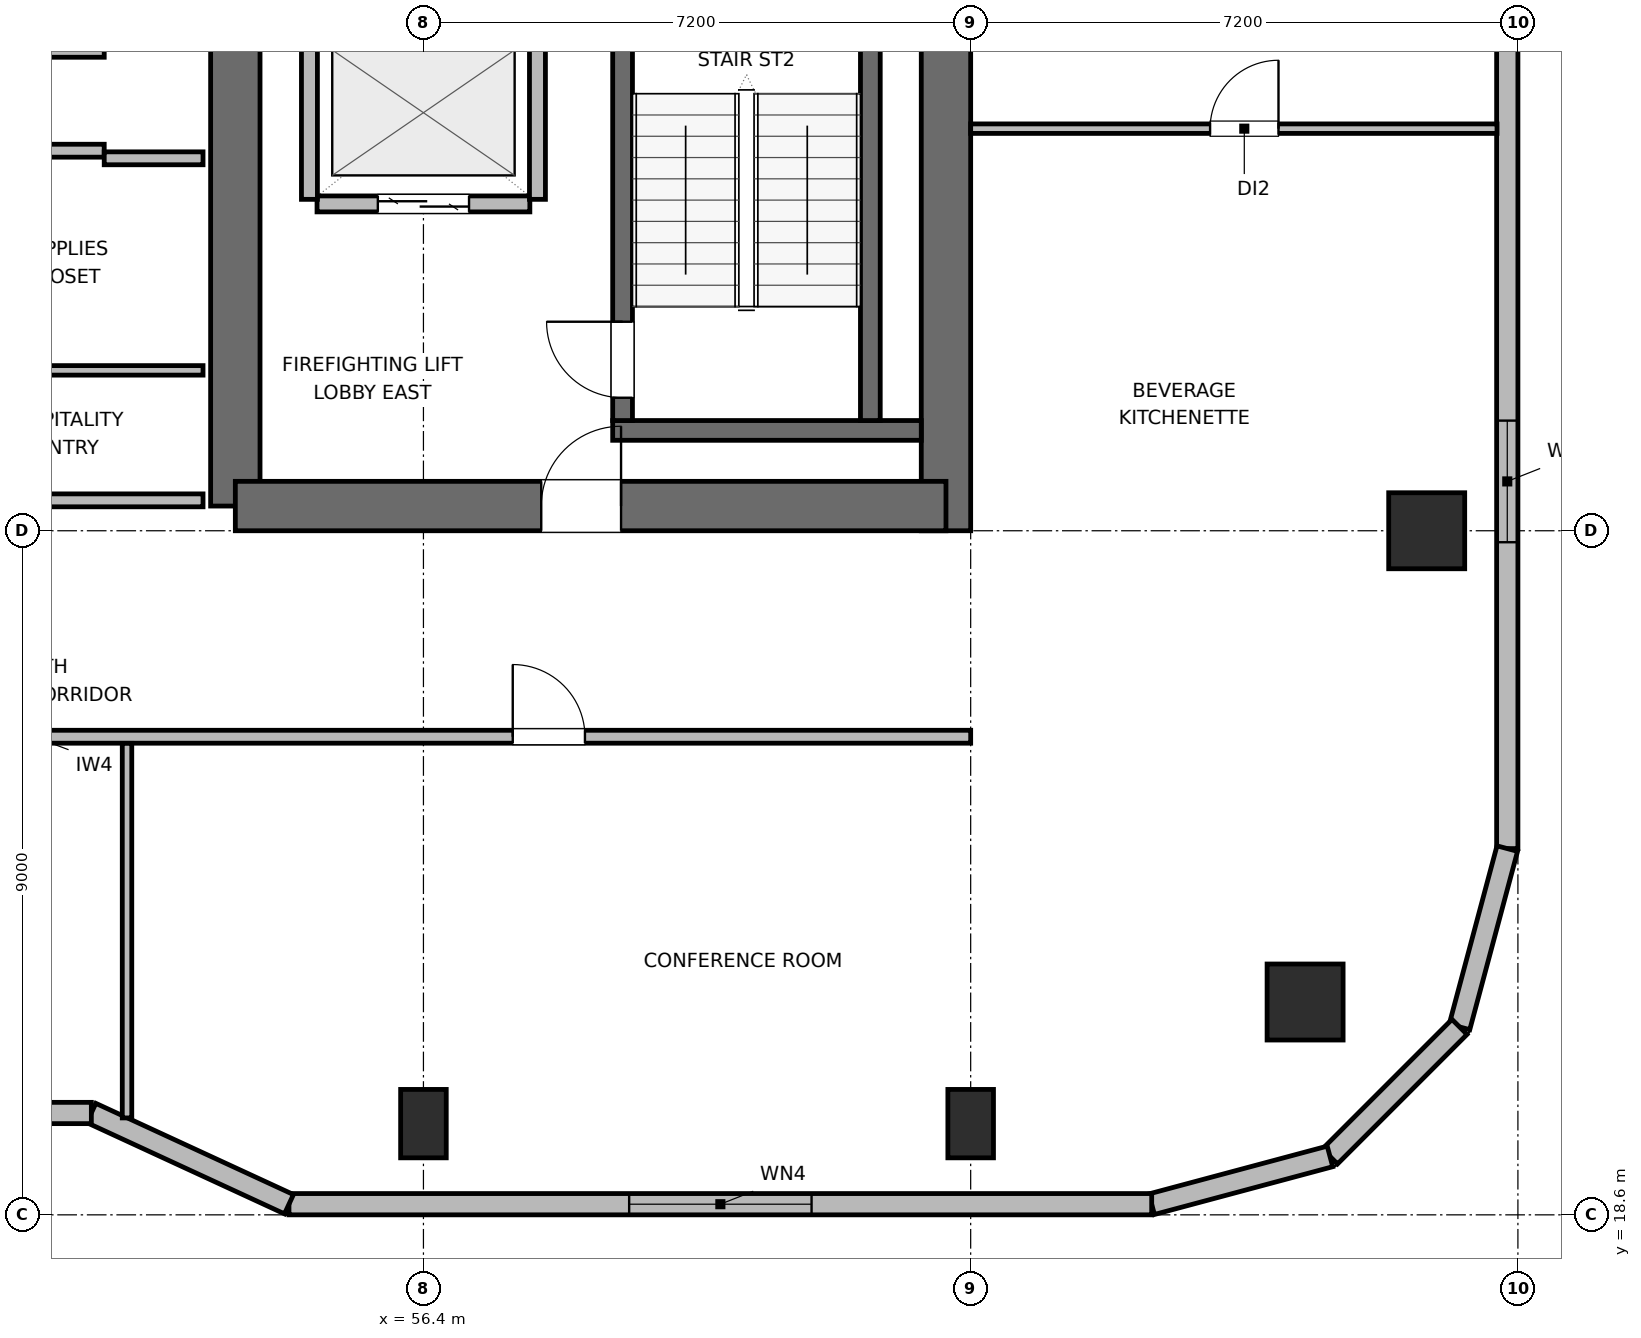
"""IFC4 building model, lengths in metres.
Left out: names, types, materials, properties, quantities, classifications, styles, units other than length and angle.
Written with IfcOpenShell. Run it as: python <this file> out.ifc"""

import sys

from ifc_helpers import new_model, si_unit, direction, frame, frame_2d, origin, origin_2d, place, context, subcontext, project, spatial, rectangle, circle, extrude, element, fill, save


model = new_model("IFC4")
c1 = context("Model", 3, precision=1e-05, world=origin(), true_north=direction((0.0, 1.0)))
c2 = subcontext(c1, "Body", "Model", "MODEL_VIEW")
j1 = project(units=[si_unit("LENGTHUNIT", "METRE"), si_unit("PLANEANGLEUNIT", "RADIAN")], contexts=[c1])
p1 = place(None, origin())
s1 = spatial("IfcSite", under=j1, at=p1, CompositionType="ELEMENT")
p2 = place(p1, origin())
s2 = spatial("IfcBuilding", under=s1, at=p2, CompositionType="ELEMENT")
p3 = place(p2, frame((0.0, 0.0, 258.9)))
s3 = spatial("IfcBuildingStorey", under=s2, at=p3, CompositionType="ELEMENT", Elevation=258.9)
p4 = place(p3, frame((53.925, 27.925, 0.0), z_axis=(0.0, 0.0, 1.0), x_axis=(0.0, 1.0, 0.0)))
e1 = element("IfcWall", 1, at=p4, inside=s3, PredefinedType="SHEAR", context=c2, shape_type="SweptSolid", body=[
    extrude(rectangle(XDim=7.875, YDim=0.65, at=frame_2d((3.938, 0.0))), origin(), (0.0, 0.0, 1.0), 3.9),
])
p5 = place(p3, frame((63.275, 27.6, 0.0), z_axis=(0.0, 0.0, 1.0), x_axis=(0.0, 1.0, 0.0)))
e2 = element("IfcWall", 2, at=p5, inside=s3, PredefinedType="SHEAR", context=c2, shape_type="SweptSolid", body=[
    extrude(rectangle(XDim=16.8, YDim=0.65, at=frame_2d((8.4, 0.0))), origin(), (0.0, 0.0, 1.0), 3.9),
])
p6 = place(p3, frame((53.925, 27.925, 0.0), z_axis=(0.0, 0.0, 1.0), x_axis=(1.0, 0.0, 0.0)))
e3 = element("IfcWall", 3, at=p6, inside=s3, PredefinedType="SHEAR", context=c2, shape_type="SweptSolid", body=[
    extrude(rectangle(XDim=9.35, YDim=0.65, at=frame_2d((4.675, 0.0))), origin(), (0.0, 0.0, 1.0), 3.9),
])
p7 = place(p6, frame((4.025, 0.0, 0.0)))
e4 = element("IfcOpeningElement", 4, at=p7, cuts=e3, PredefinedType="OPENING", context=c2, shape_type="SweptSolid", body=[
    extrude(rectangle(XDim=1.05, YDim=2.04, at=frame_2d((0.525, 1.02))), frame((0.0, 0.335, 0.0), z_axis=(0.0, -1.0, 0.0), x_axis=(1.0, 0.0, 0.0)), (0.0, 0.0, 1.0), 0.67),
])
p8 = place(p3, frame((58.89, 28.92, 0.0), z_axis=(0.0, 0.0, 1.0), x_axis=(1.0, 0.0, 0.0)))
e5 = element("IfcWall", 5, at=p8, inside=s3, PredefinedType="SHEAR", context=c2, shape_type="SweptSolid", body=[
    extrude(rectangle(XDim=4.06, YDim=0.26, at=frame_2d((2.03, 0.0))), origin(), (0.0, 0.0, 1.0), 3.9),
])
p9 = place(p3, frame((59.02, 29.05, 0.0), z_axis=(0.0, 0.0, 1.0), x_axis=(0.0, 1.0, 0.0)))
e6 = element("IfcWall", 6, at=p9, inside=s3, PredefinedType="SHEAR", context=c2, shape_type="SweptSolid", body=[
    extrude(rectangle(XDim=7.6, YDim=0.26, at=frame_2d((3.8, 0.0))), origin(), (0.0, 0.0, 1.0), 3.9),
])
p10 = place(p9, frame((0.3, 0.0, 0.0)))
e7 = element("IfcOpeningElement", 7, at=p10, cuts=e6, PredefinedType="OPENING", context=c2, shape_type="SweptSolid", body=[
    extrude(rectangle(XDim=1.0, YDim=2.04, at=frame_2d((0.5, 1.02))), frame((0.0, 0.14, 0.0), z_axis=(0.0, -1.0, 0.0), x_axis=(1.0, 0.0, 0.0)), (0.0, 0.0, 1.0), 0.28),
])
p11 = place(p3, frame((62.28, 29.05, 0.0), z_axis=(0.0, 0.0, 1.0), x_axis=(0.0, 1.0, 0.0)))
e8 = element("IfcWall", 8, at=p11, inside=s3, PredefinedType="SHEAR", context=c2, shape_type="SweptSolid", body=[
    extrude(rectangle(XDim=7.6, YDim=0.26, at=frame_2d((3.8, 0.0))), origin(), (0.0, 0.0, 1.0), 3.9),
])
p12 = place(p3, frame((68.0, 21.4, 0.0), z_axis=(0.0, 0.0, 1.0), x_axis=(1.0, 0.0, 0.0)))
e9 = element("IfcColumn", 9, at=p12, inside=s3, PredefinedType="COLUMN", context=c2, shape_type="SweptSolid", body=[
    extrude(circle(Radius=0.5, at=origin_2d()), origin(), (0.0, 0.0, 1.0), 3.9),
])
for number, where, z_axis, x_axis in (
    (10, (56.4, 19.8, 0.0), (0.0, 0.0, 1.0), (1.0, 0.0, 0.0)),
    (11, (63.6, 19.8, 0.0), (0.0, 0.0, 1.0), (1.0, 0.0, 0.0)),
):
    element("IfcColumn", number, at=place(p3, frame(where, z_axis=z_axis, x_axis=x_axis)), inside=s3, PredefinedType="COLUMN", context=c2, shape_type="SweptSolid", body=[
        extrude(rectangle(XDim=0.6, YDim=0.9, at=origin_2d()), origin(), (0.0, 0.0, 1.0), 3.9),
    ])
p13 = place(p3, frame((69.6, 27.6, 0.0), z_axis=(0.0, 0.0, 1.0), x_axis=(1.0, 0.0, 0.0)))
e12 = element("IfcColumn", 12, at=p13, inside=s3, PredefinedType="COLUMN", context=c2, shape_type="SweptSolid", body=[
    extrude(rectangle(XDim=1.0, YDim=1.0, at=origin_2d()), origin(), (0.0, 0.0, 1.0), 3.9),
])
p14 = place(p3, frame((70.66, 37.66, 0.0), z_axis=(0.0, 0.0, 1.0), x_axis=(0.0, -1.0, 0.0)))
e13 = element("IfcWall", 13, at=p14, inside=s3, PredefinedType="SOLIDWALL", context=c2, shape_type="SweptSolid", body=[
    extrude(rectangle(XDim=14.241, YDim=0.28, at=frame_2d((7.121, 0.0))), origin(), (0.0, 0.0, 1.0), 3.68),
])
p15 = place(p14, frame((8.611, 0.0, 0.85)))
e14 = element("IfcOpeningElement", 14, at=p15, cuts=e13, PredefinedType="OPENING", context=c2, shape_type="SweptSolid", body=[
    extrude(rectangle(XDim=1.6, YDim=1.0, at=frame_2d((0.8, 0.5))), frame((0.0, 0.15, 0.0), z_axis=(0.0, -1.0, 0.0), x_axis=(1.0, 0.0, 0.0)), (0.0, 0.0, 1.0), 0.3),
])
p16 = place(p3, frame((70.66, 23.418, 0.0), z_axis=(0.0, 0.0, 1.0), x_axis=(-0.258751159445, -0.965944013639, 0.0)))
e15 = element("IfcWall", 15, at=p16, inside=s3, PredefinedType="SOLIDWALL", context=c2, shape_type="SweptSolid", body=[
    extrude(rectangle(XDim=2.429, YDim=0.28, at=frame_2d((1.214, 0.0))), origin(), (0.0, 0.0, 1.0), 3.68),
])
p17 = place(p3, frame((70.031, 21.073, 0.0), z_axis=(0.0, 0.0, 1.0), x_axis=(-0.707106781187, -0.707106781187, 0.0)))
e16 = element("IfcWall", 16, at=p17, inside=s3, PredefinedType="SOLIDWALL", context=c2, shape_type="SweptSolid", body=[
    extrude(rectangle(XDim=2.41, YDim=0.28, at=frame_2d((1.205, 0.0))), origin(), (0.0, 0.0, 1.0), 3.68),
])
p18 = place(p3, frame((68.327, 19.368, 0.0), z_axis=(0.0, 0.0, 1.0), x_axis=(-0.965937282298, -0.25877628691, 0.0)))
e17 = element("IfcWall", 17, at=p18, inside=s3, PredefinedType="SOLIDWALL", context=c2, shape_type="SweptSolid", body=[
    extrude(rectangle(XDim=2.428, YDim=0.28, at=frame_2d((1.214, 0.0))), origin(), (0.0, 0.0, 1.0), 3.68),
])
p19 = place(p3, frame((65.982, 18.74, 0.0), z_axis=(0.0, 0.0, 1.0), x_axis=(-1.0, 0.0, 0.0)))
e18 = element("IfcWall", 18, at=p19, inside=s3, PredefinedType="SOLIDWALL", context=c2, shape_type="SweptSolid", body=[
    extrude(rectangle(XDim=11.351, YDim=0.28, at=frame_2d((5.676, 0.0))), origin(), (0.0, 0.0, 1.0), 3.68),
])
p20 = place(p19, frame((4.475, 0.0, 0.85)))
e19 = element("IfcOpeningElement", 19, at=p20, cuts=e18, PredefinedType="OPENING", context=c2, shape_type="SweptSolid", body=[
    extrude(rectangle(XDim=2.4, YDim=1.15, at=frame_2d((1.2, 0.575))), frame((0.0, 0.15, 0.0), z_axis=(0.0, -1.0, 0.0), x_axis=(1.0, 0.0, 0.0)), (0.0, 0.0, 1.0), 0.3),
])
p21 = place(p3, frame((54.631, 18.74, 0.0), z_axis=(0.0, 0.0, 1.0), x_axis=(-0.907956889006, 0.419063584324, 0.0)))
e20 = element("IfcWall", 20, at=p21, inside=s3, PredefinedType="SOLIDWALL", context=c2, shape_type="SweptSolid", body=[
    extrude(rectangle(XDim=2.864, YDim=0.28, at=frame_2d((1.432, 0.0))), origin(), (0.0, 0.0, 1.0), 2.265),
])
p22 = place(p3, frame((52.031, 19.94, 0.0), z_axis=(0.0, 0.0, 1.0), x_axis=(-1.0, 0.0, 0.0)))
e21 = element("IfcWall", 21, at=p22, inside=s3, PredefinedType="SOLIDWALL", context=c2, shape_type="SweptSolid", body=[
    extrude(rectangle(XDim=4.691, YDim=0.28, at=frame_2d((2.345, 0.0))), origin(), (0.0, 0.0, 1.0), 2.265),
])
p23 = place(p22, frame((1.545, 0.0, 0.85)))
e22 = element("IfcOpeningElement", 22, at=p23, cuts=e21, PredefinedType="OPENING", context=c2, shape_type="SweptSolid", body=[
    extrude(rectangle(XDim=1.6, YDim=1.0, at=frame_2d((0.8, 0.5))), frame((0.0, 0.15, 0.0), z_axis=(0.0, -1.0, 0.0), x_axis=(1.0, 0.0, 0.0)), (0.0, 0.0, 1.0), 0.3),
])
p24 = place(p3, frame((55.0, 31.9, 0.0), z_axis=(0.0, 0.0, 1.0), x_axis=(1.0, 0.0, 0.0)))
e23 = element("IfcWall", 23, at=p24, inside=s3, PredefinedType="PARTITIONING", context=c2, shape_type="SweptSolid", body=[
    extrude(rectangle(XDim=2.8, YDim=0.21, at=frame_2d((1.4, 0.0))), origin(), (0.0, 0.0, 1.0), 3.68),
])
p25 = place(p24, frame((0.8, 0.0, 0.0)))
e24 = element("IfcOpeningElement", 24, at=p25, cuts=e23, PredefinedType="OPENING", context=c2, shape_type="SweptSolid", body=[
    extrude(rectangle(XDim=1.2, YDim=2.04, at=frame_2d((0.6, 1.02))), frame((0.0, 0.115, 0.0), z_axis=(0.0, -1.0, 0.0), x_axis=(1.0, 0.0, 0.0)), (0.0, 0.0, 1.0), 0.23),
])
for number, where, z_axis, x_axis in (
    (25, (54.9, 31.96, 0.0), (0.0, 0.0, 1.0), (0.0, 1.0, 0.0)),
    (26, (57.9, 31.96, 0.0), (0.0, 0.0, 1.0), (0.0, 1.0, 0.0)),
):
    element("IfcWall", number, at=place(p3, frame(where, z_axis=z_axis, x_axis=x_axis)), inside=s3, PredefinedType="PARTITIONING", context=c2, shape_type="SweptSolid", body=[
        extrude(rectangle(XDim=2.28, YDim=0.21, at=frame_2d((1.14, 0.0))), origin(), (0.0, 0.0, 1.0), 3.68),
    ])
p26 = place(p3, frame((49.287, 32.6, 0.0), z_axis=(0.0, 0.0, 1.0), x_axis=(1.0, 0.0, 0.0)))
e27 = element("IfcWall", 27, at=p26, inside=s3, PredefinedType="PARTITIONING", context=c2, shape_type="SweptSolid", body=[
    extrude(rectangle(XDim=2.913, YDim=0.17, at=frame_2d((1.457, 0.0))), origin(), (0.0, 0.0, 1.0), 3.68),
])
p27 = place(p3, frame((49.287, 33.892, 0.0), z_axis=(0.0, 0.0, 1.0), x_axis=(1.0, 0.0, 0.0)))
e28 = element("IfcWall", 28, at=p27, inside=s3, PredefinedType="PARTITIONING", context=c2, shape_type="SweptSolid", body=[
    extrude(rectangle(XDim=2.913, YDim=0.125, at=frame_2d((1.457, 0.0))), origin(), (0.0, 0.0, 1.0), 3.68),
])
p28 = place(p3, frame((49.287, 28.0, 0.0), z_axis=(0.0, 0.0, 1.0), x_axis=(1.0, 0.0, 0.0)))
e29 = element("IfcWall", 29, at=p28, inside=s3, PredefinedType="PARTITIONING", context=c2, shape_type="SweptSolid", body=[
    extrude(rectangle(XDim=4.213, YDim=0.17, at=frame_2d((2.106, 0.0))), origin(), (0.0, 0.0, 1.0), 2.765),
])
p29 = place(p3, frame((52.2, 32.5, 0.0), z_axis=(0.0, 0.0, 1.0), x_axis=(1.0, 0.0, 0.0)))
e30 = element("IfcWall", 30, at=p29, inside=s3, PredefinedType="PARTITIONING", context=c2, shape_type="SweptSolid", body=[
    extrude(rectangle(XDim=1.3, YDim=0.17, at=frame_2d((0.65, 0.0))), origin(), (0.0, 0.0, 1.0), 3.68),
])
p30 = place(p3, frame((49.287, 29.71, 0.0), z_axis=(0.0, 0.0, 1.0), x_axis=(1.0, 0.0, 0.0)))
e31 = element("IfcWall", 31, at=p30, inside=s3, PredefinedType="PARTITIONING", context=c2, shape_type="SweptSolid", body=[
    extrude(rectangle(XDim=4.213, YDim=0.125, at=frame_2d((2.106, 0.0))), origin(), (0.0, 0.0, 1.0), 3.68),
])
p31 = place(p3, frame((29.8, 24.89, 0.0), z_axis=(0.0, 0.0, 1.0), x_axis=(1.0, 0.0, 0.0)))
e32 = element("IfcWall", 32, at=p31, inside=s3, PredefinedType="PARTITIONING", context=c2, shape_type="SweptSolid", body=[
    extrude(rectangle(XDim=33.8, YDim=0.17, at=frame_2d((16.9, 0.0))), origin(), (0.0, 0.0, 1.0), 3.68),
])
p32 = place(p31, frame((2.875, 0.0, 0.0)))
e33 = element("IfcOpeningElement", 33, at=p32, cuts=e32, PredefinedType="OPENING", context=c2, shape_type="SweptSolid", body=[
    extrude(rectangle(XDim=0.95, YDim=2.04, at=frame_2d((0.475, 1.02))), frame((0.0, 0.095, 0.0), z_axis=(0.0, -1.0, 0.0), x_axis=(1.0, 0.0, 0.0)), (0.0, 0.0, 1.0), 0.19),
])
p33 = place(p31, frame((14.225, 0.0, 0.0)))
e34 = element("IfcOpeningElement", 34, at=p33, cuts=e32, PredefinedType="OPENING", context=c2, shape_type="SweptSolid", body=[
    extrude(rectangle(XDim=0.95, YDim=2.04, at=frame_2d((0.475, 1.02))), frame((0.0, 0.095, 0.0), z_axis=(0.0, -1.0, 0.0), x_axis=(1.0, 0.0, 0.0)), (0.0, 0.0, 1.0), 0.19),
])
p34 = place(p31, frame((27.775, 0.0, 0.0)))
e35 = element("IfcOpeningElement", 35, at=p34, cuts=e32, PredefinedType="OPENING", context=c2, shape_type="SweptSolid", body=[
    extrude(rectangle(XDim=0.95, YDim=2.04, at=frame_2d((0.475, 1.02))), frame((0.0, 0.095, 0.0), z_axis=(0.0, -1.0, 0.0), x_axis=(1.0, 0.0, 0.0)), (0.0, 0.0, 1.0), 0.19),
])
p35 = place(p3, frame((52.5, 19.875, 0.0), z_axis=(0.0, 0.0, 1.0), x_axis=(0.0, 1.0, 0.0)))
e36 = element("IfcWall", 36, at=p35, inside=s3, PredefinedType="PARTITIONING", context=c2, shape_type="SweptSolid", body=[
    extrude(rectangle(XDim=4.928, YDim=0.125, at=frame_2d((2.464, 0.0))), origin(), (0.0, 0.0, 1.0), 3.043),
])
p36 = place(p3, frame((63.6, 32.89, 0.0), z_axis=(0.0, 0.0, 1.0), x_axis=(1.0, 0.0, 0.0)))
e37 = element("IfcWall", 37, at=p36, inside=s3, PredefinedType="PARTITIONING", context=c2, shape_type="SweptSolid", body=[
    extrude(rectangle(XDim=6.925, YDim=0.125, at=frame_2d((3.462, 0.0))), origin(), (0.0, 0.0, 1.0), 3.68),
])
p37 = place(p36, frame((3.15, 0.0, 0.0)))
e38 = element("IfcOpeningElement", 38, at=p37, cuts=e37, PredefinedType="OPENING", context=c2, shape_type="SweptSolid", body=[
    extrude(rectangle(XDim=0.9, YDim=2.02, at=frame_2d((0.45, 1.01))), frame((0.0, 0.073, 0.0), z_axis=(0.0, -1.0, 0.0), x_axis=(1.0, 0.0, 0.0)), (0.0, 0.0, 1.0), 0.145),
])
p38 = place(p15, origin())
e39 = element("IfcWindow", 39, at=p38, inside=s3, PartitioningType="SINGLE_PANEL", PredefinedType="WINDOW", context=c2, shape_type="SweptSolid", body=[
    extrude(rectangle(XDim=1.6, YDim=1.0, at=frame_2d((0.8, 0.5))), frame((0.0, 0.03, 0.0), z_axis=(0.0, -1.0, 0.0), x_axis=(1.0, 0.0, 0.0)), (0.0, 0.0, 1.0), 0.06),
])
fill(e14, e39)
p39 = place(p20, origin())
e40 = element("IfcWindow", 40, at=p39, inside=s3, PartitioningType="SINGLE_PANEL", PredefinedType="WINDOW", context=c2, shape_type="SweptSolid", body=[
    extrude(rectangle(XDim=2.4, YDim=1.15, at=frame_2d((1.2, 0.575))), frame((0.0, 0.03, 0.0), z_axis=(0.0, -1.0, 0.0), x_axis=(1.0, 0.0, 0.0)), (0.0, 0.0, 1.0), 0.06),
])
fill(e19, e40)
p40 = place(p10, origin())
e41 = element("IfcDoor", 41, at=p40, inside=s3, OperationType="SINGLE_SWING_RIGHT", PredefinedType="DOOR", context=c2, shape_type="SweptSolid", body=[
    extrude(rectangle(XDim=1.0, YDim=2.04, at=frame_2d((0.5, 1.02))), frame((0.0, 0.025, 0.0), z_axis=(0.0, -1.0, 0.0), x_axis=(1.0, 0.0, 0.0)), (0.0, 0.0, 1.0), 0.05),
])
fill(e7, e41)
p41 = place(p25, origin())
e42 = element("IfcDoor", 42, at=p41, inside=s3, OperationType="DOUBLE_DOOR_SLIDING", PredefinedType="DOOR", context=c2, shape_type="SweptSolid", body=[
    extrude(rectangle(XDim=1.2, YDim=2.04, at=frame_2d((0.6, 1.02))), frame((0.0, 0.025, 0.0), z_axis=(0.0, -1.0, 0.0), x_axis=(1.0, 0.0, 0.0)), (0.0, 0.0, 1.0), 0.05),
])
fill(e24, e42)
p42 = place(p7, origin())
e43 = element("IfcDoor", 43, at=p42, inside=s3, OperationType="SINGLE_SWING_RIGHT", PredefinedType="DOOR", context=c2, shape_type="SweptSolid", body=[
    extrude(rectangle(XDim=1.05, YDim=2.04, at=frame_2d((0.525, 1.02))), frame((0.0, 0.025, 0.0), z_axis=(0.0, -1.0, 0.0), x_axis=(1.0, 0.0, 0.0)), (0.0, 0.0, 1.0), 0.05),
])
fill(e4, e43)
p43 = place(p34, origin())
e44 = element("IfcDoor", 44, at=p43, inside=s3, OperationType="SINGLE_SWING_LEFT", PredefinedType="DOOR", context=c2, shape_type="SweptSolid", body=[
    extrude(rectangle(XDim=0.95, YDim=2.04, at=frame_2d((0.475, 1.02))), frame((0.0, 0.025, 0.0), z_axis=(0.0, -1.0, 0.0), x_axis=(1.0, 0.0, 0.0)), (0.0, 0.0, 1.0), 0.05),
])
fill(e35, e44)
p44 = place(p37, origin())
e45 = element("IfcDoor", 45, at=p44, inside=s3, OperationType="SINGLE_SWING_RIGHT", PredefinedType="DOOR", context=c2, shape_type="SweptSolid", body=[
    extrude(rectangle(XDim=0.9, YDim=2.02, at=frame_2d((0.45, 1.01))), frame((0.0, 0.025, 0.0), z_axis=(0.0, -1.0, 0.0), x_axis=(1.0, 0.0, 0.0)), (0.0, 0.0, 1.0), 0.05),
])
fill(e38, e45)
save(model, sys.argv[1])
